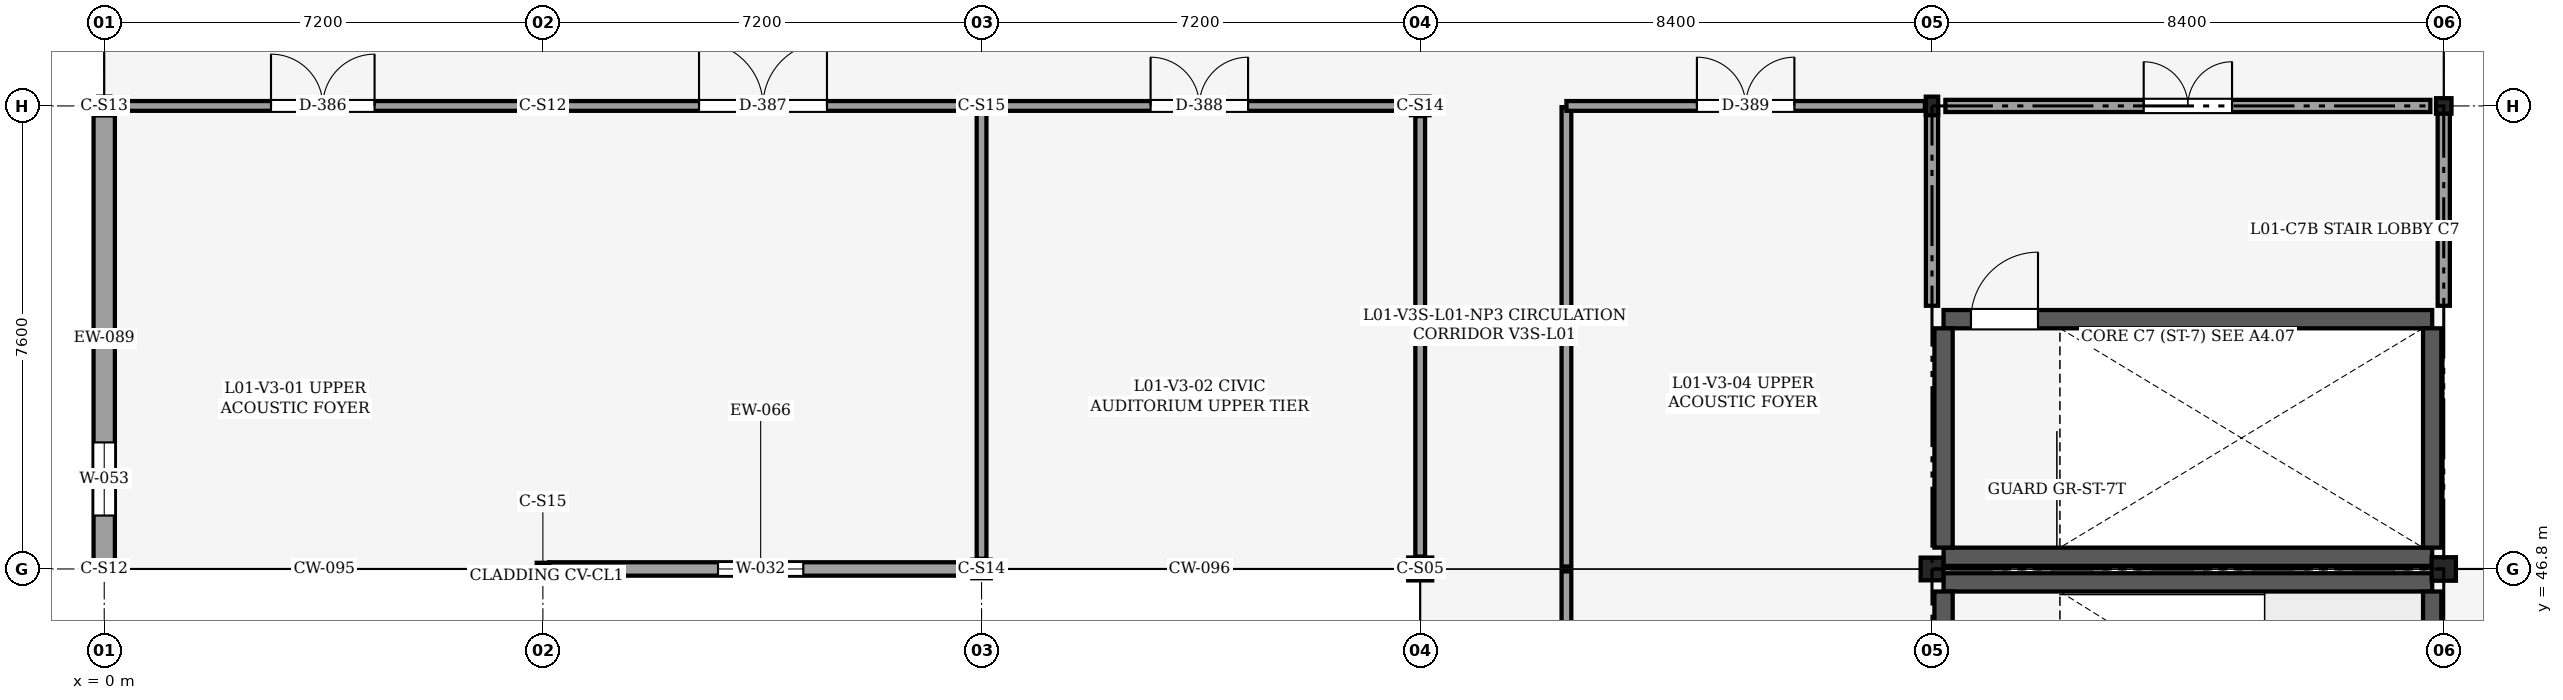
"""IFC4 building model, lengths in metres.
Left out: names, types, materials, properties, quantities, classifications, styles, units other than length and angle.
Written with IfcOpenShell. Run it as: python <this file> out.ifc"""

import sys

from ifc_helpers import new_model, si_unit, direction, frame, frame_2d, origin, origin_2d, place, context, subcontext, project, spatial, rectangle, hollow_rectangle, i_section, extrude, element, fill, save


model = new_model("IFC4")
c1 = context("Model", 3, precision=1e-05, world=origin(), true_north=direction((0.0, 1.0)))
c2 = subcontext(c1, "Body", "Model", "MODEL_VIEW")
j1 = project(units=[si_unit("LENGTHUNIT", "METRE"), si_unit("PLANEANGLEUNIT", "RADIAN")], contexts=[c1])
p1 = place(None, origin())
s1 = spatial("IfcSite", under=j1, at=p1, CompositionType="ELEMENT")
p2 = place(p1, origin())
s2 = spatial("IfcBuilding", under=s1, at=p2, CompositionType="ELEMENT")
p3 = place(p2, frame((0.0, 0.0, 5.4)))
s3 = spatial("IfcBuildingStorey", under=s2, at=p3, CompositionType="ELEMENT", Elevation=5.4)
p4 = place(p3, frame((0.0, 46.8, 0.0), z_axis=(0.0, 0.0, 1.0), x_axis=(1.0, 0.0, 0.0)))
e1 = element("IfcColumn", 1, at=p4, inside=s3, PredefinedType="COLUMN", context=c2, shape_type="SweptSolid", body=[
    extrude(hollow_rectangle(XDim=0.254, YDim=0.254, WallThickness=0.013, OuterFilletRadius=0.025, at=origin_2d()), origin(), (0.0, 0.0, 1.0), 4.8),
])
p5 = place(p3, frame((0.0, 54.4, 0.0), z_axis=(0.0, 0.0, 1.0), x_axis=(1.0, 0.0, 0.0)))
e2 = element("IfcColumn", 2, at=p5, inside=s3, PredefinedType="COLUMN", context=c2, shape_type="SweptSolid", body=[
    extrude(hollow_rectangle(XDim=0.203, YDim=0.305, WallThickness=0.013, OuterFilletRadius=0.025, at=origin_2d()), origin(), (0.0, 0.0, 1.0), 4.8),
])
p6 = place(p3, frame((7.2, 46.8, 0.0), z_axis=(0.0, 0.0, 1.0), x_axis=(1.0, 0.0, 0.0)))
e3 = element("IfcColumn", 3, at=p6, inside=s3, PredefinedType="COLUMN", context=c2, shape_type="SweptSolid", body=[
    extrude(hollow_rectangle(XDim=0.203, YDim=0.203, WallThickness=0.013, OuterFilletRadius=0.025, at=origin_2d()), origin(), (0.0, 0.0, 1.0), 4.8),
])
p7 = place(p3, frame((7.2, 54.4, 0.0), z_axis=(0.0, 0.0, 1.0), x_axis=(1.0, 0.0, 0.0)))
e4 = element("IfcColumn", 4, at=p7, inside=s3, PredefinedType="COLUMN", context=c2, shape_type="SweptSolid", body=[
    extrude(hollow_rectangle(XDim=0.254, YDim=0.254, WallThickness=0.013, OuterFilletRadius=0.025, at=origin_2d()), origin(), (0.0, 0.0, 1.0), 4.8),
])
p8 = place(p3, frame((14.4, 46.8, 0.0), z_axis=(0.0, 0.0, 1.0), x_axis=(1.0, 0.0, 0.0)))
e5 = element("IfcColumn", 5, at=p8, inside=s3, PredefinedType="COLUMN", context=c2, shape_type="SweptSolid", body=[
    extrude(hollow_rectangle(XDim=0.305, YDim=0.305, WallThickness=0.016, OuterFilletRadius=0.032, at=origin_2d()), origin(), (0.0, 0.0, 1.0), 4.8),
])
p9 = place(p3, frame((14.4, 54.4, 0.0), z_axis=(0.0, 0.0, 1.0), x_axis=(1.0, 0.0, 0.0)))
e6 = element("IfcColumn", 6, at=p9, inside=s3, PredefinedType="COLUMN", context=c2, shape_type="SweptSolid", body=[
    extrude(hollow_rectangle(XDim=0.203, YDim=0.203, WallThickness=0.013, OuterFilletRadius=0.025, at=origin_2d()), origin(), (0.0, 0.0, 1.0), 4.8),
])
p10 = place(p3, frame((21.6, 46.8, 0.0), z_axis=(0.0, 0.0, 1.0), x_axis=(1.0, 0.0, 0.0)))
e7 = element("IfcColumn", 7, at=p10, inside=s3, PredefinedType="COLUMN", context=c2, shape_type="SweptSolid", body=[
    extrude(i_section(OverallWidth=0.394, OverallDepth=0.376, WebThickness=0.017, FlangeThickness=0.028, FilletRadius=0.025, at=origin_2d()), origin(), (0.0, 0.0, 1.0), 4.8),
])
p11 = place(p3, frame((21.6, 54.4, 0.0), z_axis=(0.0, 0.0, 1.0), x_axis=(1.0, 0.0, 0.0)))
e8 = element("IfcColumn", 8, at=p11, inside=s3, PredefinedType="COLUMN", context=c2, shape_type="SweptSolid", body=[
    extrude(hollow_rectangle(XDim=0.305, YDim=0.305, WallThickness=0.016, OuterFilletRadius=0.032, at=origin_2d()), origin(), (0.0, 0.0, 1.0), 4.8),
])
p12 = place(p3, frame((30.0, 46.8, 0.0), z_axis=(0.0, 0.0, 1.0), x_axis=(1.0, 0.0, 0.0)))
e9 = element("IfcColumn", 9, at=p12, inside=s3, PredefinedType="COLUMN", context=c2, shape_type="SweptSolid", body=[
    extrude(i_section(OverallWidth=0.373, OverallDepth=0.373, WebThickness=0.016, FlangeThickness=0.026, FilletRadius=0.025, at=origin_2d()), origin(), (0.0, 0.0, 1.0), 4.8),
])
p13 = place(p3, frame((30.0, 54.4, 0.0), z_axis=(0.0, 0.0, 1.0), x_axis=(1.0, 0.0, 0.0)))
e10 = element("IfcColumn", 10, at=p13, inside=s3, PredefinedType="COLUMN", context=c2, shape_type="SweptSolid", body=[
    extrude(hollow_rectangle(XDim=0.203, YDim=0.305, WallThickness=0.013, OuterFilletRadius=0.025, at=origin_2d()), origin(), (0.0, 0.0, 1.0), 4.8),
])
p14 = place(p3, frame((38.4, 46.8, 0.0), z_axis=(0.0, 0.0, 1.0), x_axis=(1.0, 0.0, 0.0)))
e11 = element("IfcColumn", 11, at=p14, inside=s3, PredefinedType="COLUMN", context=c2, shape_type="SweptSolid", body=[
    extrude(i_section(OverallWidth=0.399, OverallDepth=0.386, WebThickness=0.021, FlangeThickness=0.033, FilletRadius=0.025, at=origin_2d()), origin(), (0.0, 0.0, 1.0), 4.8),
])
p15 = place(p3, frame((38.4, 54.4, 0.0), z_axis=(0.0, 0.0, 1.0), x_axis=(1.0, 0.0, 0.0)))
e12 = element("IfcColumn", 12, at=p15, inside=s3, PredefinedType="COLUMN", context=c2, shape_type="SweptSolid", body=[
    extrude(hollow_rectangle(XDim=0.254, YDim=0.254, WallThickness=0.013, OuterFilletRadius=0.025, at=origin_2d()), origin(), (0.0, 0.0, 1.0), 4.8),
])
p16 = place(p3, frame((14.248, 46.8, 0.0), z_axis=(0.0, 0.0, 1.0), x_axis=(-1.0, 0.0, 0.0)))
e13 = element("IfcWall", 13, at=p16, inside=s3, PredefinedType="SOLIDWALL", context=c2, shape_type="SweptSolid", body=[
    extrude(rectangle(XDim=6.946, YDim=0.22, at=frame_2d((3.473, 0.0))), origin(), (0.0, 0.0, 1.0), 3.695),
])
p17 = place(p16, frame((2.773, 0.0, 0.9)))
e14 = element("IfcOpeningElement", 14, at=p17, cuts=e13, PredefinedType="OPENING", context=c2, shape_type="SweptSolid", body=[
    extrude(rectangle(XDim=1.4, YDim=1.75, at=frame_2d((0.7, 0.875))), frame((0.0, 0.12, 0.0), z_axis=(0.0, -1.0, 0.0), x_axis=(1.0, 0.0, 0.0)), (0.0, 0.0, 1.0), 0.24),
])
p18 = place(p3, frame((0.0, 46.927, 0.0), z_axis=(0.0, 0.0, 1.0), x_axis=(0.0, 1.0, 0.0)))
e15 = element("IfcWall", 15, at=p18, inside=s3, PredefinedType="SOLIDWALL", context=c2, shape_type="SweptSolid", body=[
    extrude(rectangle(XDim=7.321, YDim=0.35, at=frame_2d((3.66, 0.0))), origin(), (0.0, 0.0, 1.0), 4.54),
])
p19 = place(p18, frame((0.75, 0.0, 0.9)))
e16 = element("IfcOpeningElement", 16, at=p19, cuts=e15, PredefinedType="OPENING", context=c2, shape_type="SweptSolid", body=[
    extrude(rectangle(XDim=1.2, YDim=1.5, at=frame_2d((0.6, 0.75))), frame((0.0, 0.185, 0.0), z_axis=(0.0, -1.0, 0.0), x_axis=(1.0, 0.0, 0.0)), (0.0, 0.0, 1.0), 0.371),
])
p20 = place(p3, frame((30.19, 46.58, 0.0), z_axis=(0.0, 0.0, 1.0), x_axis=(1.0, 0.0, 0.0)))
e17 = element("IfcWall", 17, at=p20, inside=s3, PredefinedType="SHEAR", context=c2, shape_type="SweptSolid", body=[
    extrude(rectangle(XDim=8.02, YDim=0.3, at=frame_2d((4.01, 0.0))), origin(), (0.0, 0.0, 1.0), 4.54),
])
for number, where, z_axis, x_axis in (
    (18, (30.19, 42.71, 0.0), (0.0, 0.0, 1.0), (0.0, 1.0, 0.0)),
    (19, (38.21, 42.71, 0.0), (0.0, 0.0, 1.0), (0.0, 1.0, 0.0)),
):
    element("IfcWall", number, at=place(p3, frame(where, z_axis=z_axis, x_axis=x_axis)), inside=s3, PredefinedType="SHEAR", context=c2, shape_type="SweptSolid", body=[
        extrude(rectangle(XDim=3.72, YDim=0.3, at=frame_2d((1.86, 0.0))), origin(), (0.0, 0.0, 1.0), 4.54),
    ])
p21 = place(p3, frame((30.19, 47.0, 0.0), z_axis=(0.0, 0.0, 1.0), x_axis=(1.0, 0.0, 0.0)))
e20 = element("IfcWall", 20, at=p21, inside=s3, PredefinedType="SHEAR", context=c2, shape_type="SweptSolid", body=[
    extrude(rectangle(XDim=8.02, YDim=0.3, at=frame_2d((4.01, 0.0))), origin(), (0.0, 0.0, 1.0), 4.54),
])
p22 = place(p3, frame((30.19, 50.9, 0.0), z_axis=(0.0, 0.0, 1.0), x_axis=(1.0, 0.0, 0.0)))
e21 = element("IfcWall", 21, at=p22, inside=s3, PredefinedType="SHEAR", context=c2, shape_type="SweptSolid", body=[
    extrude(rectangle(XDim=8.02, YDim=0.3, at=frame_2d((4.01, 0.0))), origin(), (0.0, 0.0, 1.0), 4.54),
])
p23 = place(p22, frame((0.45, 0.0, 0.0)))
e22 = element("IfcOpeningElement", 22, at=p23, cuts=e21, PredefinedType="OPENING", context=c2, shape_type="SweptSolid", body=[
    extrude(rectangle(XDim=1.1, YDim=2.15, at=frame_2d((0.55, 1.075))), frame((0.0, 0.16, 0.0), z_axis=(0.0, -1.0, 0.0), x_axis=(1.0, 0.0, 0.0)), (0.0, 0.0, 1.0), 0.321),
])
for number, where, z_axis, x_axis in (
    (23, (30.19, 47.15, 0.0), (0.0, 0.0, 1.0), (0.0, 1.0, 0.0)),
    (24, (38.21, 47.15, 0.0), (0.0, 0.0, 1.0), (0.0, 1.0, 0.0)),
):
    element("IfcWall", number, at=place(p3, frame(where, z_axis=z_axis, x_axis=x_axis)), inside=s3, PredefinedType="SHEAR", context=c2, shape_type="SweptSolid", body=[
        extrude(rectangle(XDim=3.6, YDim=0.3, at=frame_2d((1.8, 0.0))), origin(), (0.0, 0.0, 1.0), 4.54),
    ])
for number, where, z_axis, x_axis in (
    (25, (30.0, 51.12, 0.0), (0.0, 0.0, 1.0), (0.0, 1.0, 0.0)),
    (26, (38.4, 51.12, 0.0), (0.0, 0.0, 1.0), (0.0, 1.0, 0.0)),
):
    element("IfcWall", number, at=place(p3, frame(where, z_axis=z_axis, x_axis=x_axis)), inside=s3, PredefinedType="PARTITIONING", context=c2, shape_type="SweptSolid", body=[
        extrude(rectangle(XDim=3.26, YDim=0.2, at=frame_2d((1.63, 0.0))), origin(), (0.0, 0.0, 1.0), 4.54),
    ])
p24 = place(p3, frame((30.22, 54.4, 0.0), z_axis=(0.0, 0.0, 1.0), x_axis=(1.0, 0.0, 0.0)))
e27 = element("IfcWall", 27, at=p24, inside=s3, PredefinedType="PARTITIONING", context=c2, shape_type="SweptSolid", body=[
    extrude(rectangle(XDim=7.96, YDim=0.2, at=frame_2d((3.98, 0.0))), origin(), (0.0, 0.0, 1.0), 4.54),
])
p25 = place(p24, frame((3.255, 0.0, 0.0)))
e28 = element("IfcOpeningElement", 28, at=p25, cuts=e27, PredefinedType="OPENING", context=c2, shape_type="SweptSolid", body=[
    extrude(rectangle(XDim=1.45, YDim=2.2, at=frame_2d((0.725, 1.1))), frame((0.0, 0.11, 0.0), z_axis=(0.0, -1.0, 0.0), x_axis=(1.0, 0.0, 0.0)), (0.0, 0.0, 1.0), 0.22),
])
p26 = place(p3, frame((24.0, 38.42, 0.0), z_axis=(0.0, 0.0, 1.0), x_axis=(0.0, 1.0, 0.0)))
e29 = element("IfcWall", 29, at=p26, inside=s3, PredefinedType="PARTITIONING", context=c2, shape_type="SweptSolid", body=[
    extrude(rectangle(XDim=8.34, YDim=0.16, at=frame_2d((4.17, 0.0))), origin(), (0.0, 0.0, 1.0), 4.52),
])
p27 = place(p3, frame((0.117, 54.4, 0.0), z_axis=(0.0, 0.0, 1.0), x_axis=(1.0, 0.0, 0.0)))
e30 = element("IfcWall", 30, at=p27, inside=s3, PredefinedType="PARTITIONING", context=c2, shape_type="SweptSolid", body=[
    extrude(rectangle(XDim=6.941, YDim=0.16, at=frame_2d((3.471, 0.0))), origin(), (0.0, 0.0, 1.0), 4.52),
])
p28 = place(p27, frame((2.621, 0.0, 0.0)))
e31 = element("IfcOpeningElement", 31, at=p28, cuts=e30, PredefinedType="OPENING", context=c2, shape_type="SweptSolid", body=[
    extrude(rectangle(XDim=1.7, YDim=2.4, at=frame_2d((0.85, 1.2))), frame((0.0, 0.09, 0.0), z_axis=(0.0, -1.0, 0.0), x_axis=(1.0, 0.0, 0.0)), (0.0, 0.0, 1.0), 0.18),
])
p29 = place(p3, frame((7.342, 54.4, 0.0), z_axis=(0.0, 0.0, 1.0), x_axis=(1.0, 0.0, 0.0)))
e32 = element("IfcWall", 32, at=p29, inside=s3, PredefinedType="PARTITIONING", context=c2, shape_type="SweptSolid", body=[
    extrude(rectangle(XDim=6.941, YDim=0.16, at=frame_2d((3.471, 0.0))), origin(), (0.0, 0.0, 1.0), 4.52),
])
p30 = place(p29, frame((2.421, 0.0, 0.0)))
e33 = element("IfcOpeningElement", 33, at=p30, cuts=e32, PredefinedType="OPENING", context=c2, shape_type="SweptSolid", body=[
    extrude(rectangle(XDim=2.1, YDim=2.5, at=frame_2d((1.05, 1.25))), frame((0.0, 0.09, 0.0), z_axis=(0.0, -1.0, 0.0), x_axis=(1.0, 0.0, 0.0)), (0.0, 0.0, 1.0), 0.18),
])
p31 = place(p3, frame((14.4, 46.967, 0.0), z_axis=(0.0, 0.0, 1.0), x_axis=(0.0, 1.0, 0.0)))
e34 = element("IfcWall", 34, at=p31, inside=s3, PredefinedType="PARTITIONING", context=c2, shape_type="SweptSolid", body=[
    extrude(rectangle(XDim=7.316, YDim=0.16, at=frame_2d((3.658, 0.0))), origin(), (0.0, 0.0, 1.0), 4.52),
])
p32 = place(p3, frame((14.517, 54.4, 0.0), z_axis=(0.0, 0.0, 1.0), x_axis=(1.0, 0.0, 0.0)))
e35 = element("IfcWall", 35, at=p32, inside=s3, PredefinedType="PARTITIONING", context=c2, shape_type="SweptSolid", body=[
    extrude(rectangle(XDim=6.916, YDim=0.16, at=frame_2d((3.458, 0.0))), origin(), (0.0, 0.0, 1.0), 4.52),
])
p33 = place(p32, frame((2.658, 0.0, 0.0)))
e36 = element("IfcOpeningElement", 36, at=p33, cuts=e35, PredefinedType="OPENING", context=c2, shape_type="SweptSolid", body=[
    extrude(rectangle(XDim=1.6, YDim=2.35, at=frame_2d((0.8, 1.175))), frame((0.0, 0.09, 0.0), z_axis=(0.0, -1.0, 0.0), x_axis=(1.0, 0.0, 0.0)), (0.0, 0.0, 1.0), 0.18),
])
p34 = place(p3, frame((21.6, 47.003, 0.0), z_axis=(0.0, 0.0, 1.0), x_axis=(0.0, 1.0, 0.0)))
e37 = element("IfcWall", 37, at=p34, inside=s3, PredefinedType="PARTITIONING", context=c2, shape_type="SweptSolid", body=[
    extrude(rectangle(XDim=7.23, YDim=0.16, at=frame_2d((3.615, 0.0))), origin(), (0.0, 0.0, 1.0), 4.52),
])
p35 = place(p3, frame((24.0, 46.84, 0.0), z_axis=(0.0, 0.0, 1.0), x_axis=(0.0, 1.0, 0.0)))
e38 = element("IfcWall", 38, at=p35, inside=s3, PredefinedType="PARTITIONING", context=c2, shape_type="SweptSolid", body=[
    extrude(rectangle(XDim=7.54, YDim=0.16, at=frame_2d((3.77, 0.0))), origin(), (0.0, 0.0, 1.0), 4.52),
])
p36 = place(p3, frame((24.0, 54.4, 0.0), z_axis=(0.0, 0.0, 1.0), x_axis=(1.0, 0.0, 0.0)))
e39 = element("IfcWall", 39, at=p36, inside=s3, PredefinedType="PARTITIONING", context=c2, shape_type="SweptSolid", body=[
    extrude(rectangle(XDim=5.883, YDim=0.16, at=frame_2d((2.942, 0.0))), origin(), (0.0, 0.0, 1.0), 4.52),
])
p37 = place(p36, frame((2.142, 0.0, 0.0)))
e40 = element("IfcOpeningElement", 40, at=p37, cuts=e39, PredefinedType="OPENING", context=c2, shape_type="SweptSolid", body=[
    extrude(rectangle(XDim=1.6, YDim=2.35, at=frame_2d((0.8, 1.175))), frame((0.0, 0.09, 0.0), z_axis=(0.0, -1.0, 0.0), x_axis=(1.0, 0.0, 0.0)), (0.0, 0.0, 1.0), 0.18),
])
p38 = place(p17, origin())
e41 = element("IfcWindow", 41, at=p38, inside=s3, PartitioningType="SINGLE_PANEL", PredefinedType="WINDOW", context=c2, shape_type="SweptSolid", body=[
    extrude(rectangle(XDim=1.4, YDim=1.75, at=frame_2d((0.7, 0.875))), frame((0.0, 0.03, 0.0), z_axis=(0.0, -1.0, 0.0), x_axis=(1.0, 0.0, 0.0)), (0.0, 0.0, 1.0), 0.06),
])
fill(e14, e41)
p39 = place(p19, origin())
e42 = element("IfcWindow", 42, at=p39, inside=s3, PartitioningType="SINGLE_PANEL", PredefinedType="WINDOW", context=c2, shape_type="SweptSolid", body=[
    extrude(rectangle(XDim=1.2, YDim=1.5, at=frame_2d((0.6, 0.75))), frame((0.0, 0.03, 0.0), z_axis=(0.0, -1.0, 0.0), x_axis=(1.0, 0.0, 0.0)), (0.0, 0.0, 1.0), 0.06),
])
fill(e16, e42)
p40 = place(p23, origin())
e43 = element("IfcDoor", 43, at=p40, inside=s3, OperationType="SINGLE_SWING_RIGHT", PredefinedType="DOOR", context=c2, shape_type="SweptSolid", body=[
    extrude(rectangle(XDim=1.1, YDim=2.15, at=frame_2d((0.55, 1.075))), frame((0.0, 0.025, 0.0), z_axis=(0.0, -1.0, 0.0), x_axis=(1.0, 0.0, 0.0)), (0.0, 0.0, 1.0), 0.05),
])
fill(e22, e43)
p41 = place(p25, origin())
e44 = element("IfcDoor", 44, at=p41, inside=s3, OperationType="DOUBLE_DOOR_SINGLE_SWING", PredefinedType="DOOR", context=c2, shape_type="SweptSolid", body=[
    extrude(rectangle(XDim=1.45, YDim=2.2, at=frame_2d((0.725, 1.1))), frame((0.0, 0.025, 0.0), z_axis=(0.0, -1.0, 0.0), x_axis=(1.0, 0.0, 0.0)), (0.0, 0.0, 1.0), 0.05),
])
fill(e28, e44)
p42 = place(p28, origin())
e45 = element("IfcDoor", 45, at=p42, inside=s3, OperationType="DOUBLE_DOOR_SINGLE_SWING", PredefinedType="DOOR", context=c2, shape_type="SweptSolid", body=[
    extrude(rectangle(XDim=1.7, YDim=2.4, at=frame_2d((0.85, 1.2))), frame((0.0, 0.025, 0.0), z_axis=(0.0, -1.0, 0.0), x_axis=(1.0, 0.0, 0.0)), (0.0, 0.0, 1.0), 0.05),
])
fill(e31, e45)
p43 = place(p30, origin())
e46 = element("IfcDoor", 46, at=p43, inside=s3, OperationType="DOUBLE_DOOR_SINGLE_SWING", PredefinedType="DOOR", context=c2, shape_type="SweptSolid", body=[
    extrude(rectangle(XDim=2.1, YDim=2.5, at=frame_2d((1.05, 1.25))), frame((0.0, 0.025, 0.0), z_axis=(0.0, -1.0, 0.0), x_axis=(1.0, 0.0, 0.0)), (0.0, 0.0, 1.0), 0.05),
])
fill(e33, e46)
p44 = place(p33, origin())
e47 = element("IfcDoor", 47, at=p44, inside=s3, OperationType="DOUBLE_DOOR_SINGLE_SWING", PredefinedType="DOOR", context=c2, shape_type="SweptSolid", body=[
    extrude(rectangle(XDim=1.6, YDim=2.35, at=frame_2d((0.8, 1.175))), frame((0.0, 0.025, 0.0), z_axis=(0.0, -1.0, 0.0), x_axis=(1.0, 0.0, 0.0)), (0.0, 0.0, 1.0), 0.05),
])
fill(e36, e47)
p45 = place(p37, origin())
e48 = element("IfcDoor", 48, at=p45, inside=s3, OperationType="DOUBLE_DOOR_SINGLE_SWING", PredefinedType="DOOR", context=c2, shape_type="SweptSolid", body=[
    extrude(rectangle(XDim=1.6, YDim=2.35, at=frame_2d((0.8, 1.175))), frame((0.0, 0.025, 0.0), z_axis=(0.0, -1.0, 0.0), x_axis=(1.0, 0.0, 0.0)), (0.0, 0.0, 1.0), 0.05),
])
fill(e40, e48)
save(model, sys.argv[1])
